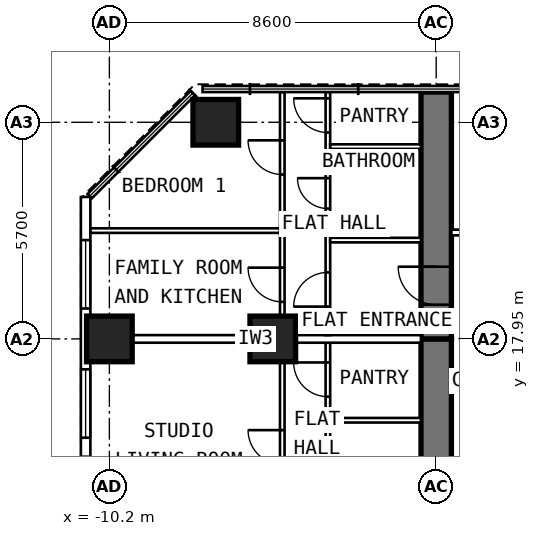
"""IFC4 building model, lengths in metres.
Left out: names, types, materials, properties, quantities, classifications, styles, units other than length and angle.
Written with IfcOpenShell. Run it as: python <this file> out.ifc"""

import sys

from ifc_helpers import new_model, si_unit, direction, frame, frame_2d, origin, origin_2d, place, context, subcontext, project, spatial, rectangle, extrude, element, fill, save


model = new_model("IFC4")
c1 = context("Model", 3, precision=1e-05, world=origin(), true_north=direction((0.0, 1.0)))
c2 = subcontext(c1, "Body", "Model", "MODEL_VIEW")
j1 = project(units=[si_unit("LENGTHUNIT", "METRE"), si_unit("PLANEANGLEUNIT", "RADIAN")], contexts=[c1])
p1 = place(None, origin())
s1 = spatial("IfcSite", under=j1, at=p1, CompositionType="ELEMENT")
p2 = place(p1, origin())
s2 = spatial("IfcBuilding", under=s1, at=p2, CompositionType="ELEMENT")
p3 = place(p2, frame((0.0, 0.0, 123.8)))
s3 = spatial("IfcBuildingStorey", under=s2, at=p3, CompositionType="ELEMENT", Elevation=123.8)
for number, where, z_axis, x_axis in (
    (1, (-10.2, 17.95, 0.0), (0.0, 0.0, 1.0), (0.0, 1.0, 0.0)),
    (2, (-7.4, 23.65, 0.0), (0.0, 0.0, 1.0), (0.0, 1.0, 0.0)),
    (3, (-5.9, 17.95, 0.0), (0.0, 0.0, 1.0), (0.0, 1.0, 0.0)),
):
    element("IfcColumn", number, at=place(p3, frame(where, z_axis=z_axis, x_axis=x_axis)), inside=s3, PredefinedType="COLUMN", context=c2, shape_type="SweptSolid", body=[
        extrude(rectangle(XDim=1.2, YDim=1.2, at=origin_2d()), origin(), (0.0, 0.0, 1.0), 3.6),
    ])
p4 = place(p3, frame((-1.6, 9.6, 0.0), z_axis=(0.0, 0.0, 1.0), x_axis=(0.0, 1.0, 0.0)))
e4 = element("IfcWall", 4, at=p4, inside=s3, PredefinedType="SHEAR", context=c2, shape_type="SweptSolid", body=[
    extrude(rectangle(XDim=8.35, YDim=0.8, at=frame_2d((4.175, 0.0))), origin(), (0.0, 0.0, 1.0), 3.6),
])
p5 = place(p4, frame((1.3, 0.0, 0.0)))
e5 = element("IfcOpeningElement", 5, at=p5, cuts=e4, PredefinedType="OPENING", context=c2, shape_type="SweptSolid", body=[
    extrude(rectangle(XDim=1.0, YDim=2.1, at=frame_2d((0.5, 1.05))), frame((0.0, 0.412, 0.0), z_axis=(0.0, -1.0, 0.0), x_axis=(1.0, 0.0, 0.0)), (0.0, 0.0, 1.0), 0.824),
])
p6 = place(p3, frame((-1.6, 17.95, 0.0), z_axis=(0.0, 0.0, 1.0), x_axis=(0.0, 1.0, 0.0)))
e6 = element("IfcWall", 6, at=p6, inside=s3, PredefinedType="SHEAR", context=c2, shape_type="SweptSolid", body=[
    extrude(rectangle(XDim=6.495, YDim=0.8, at=frame_2d((3.248, 0.0))), origin(), (0.0, 0.0, 1.0), 3.6),
])
p7 = place(p6, frame((0.9, 0.0, 0.0)))
e7 = element("IfcOpeningElement", 7, at=p7, cuts=e6, PredefinedType="OPENING", context=c2, shape_type="SweptSolid", body=[
    extrude(rectangle(XDim=1.0, YDim=2.1, at=frame_2d((0.5, 1.05))), frame((0.0, 0.412, 0.0), z_axis=(0.0, -1.0, 0.0), x_axis=(1.0, 0.0, 0.0)), (0.0, 0.0, 1.0), 0.824),
])
p8 = place(p3, frame((-10.825, 6.409, 0.0), z_axis=(0.0, 0.0, 1.0), x_axis=(0.0, 1.0, 0.0)))
e8 = element("IfcWall", 8, at=p8, inside=s3, PredefinedType="SOLIDWALL", context=c2, shape_type="SweptSolid", body=[
    extrude(rectangle(XDim=15.276, YDim=0.25, at=frame_2d((7.638, 0.0))), origin(), (0.0, 0.0, 1.0), 3.35),
])
p9 = place(p8, frame((0.941, 0.0, 0.8)))
e9 = element("IfcOpeningElement", 9, at=p9, cuts=e8, PredefinedType="OPENING", context=c2, shape_type="SweptSolid", body=[
    extrude(rectangle(XDim=1.8, YDim=1.8, at=frame_2d((0.9, 0.9))), frame((0.0, 0.137, 0.0), z_axis=(0.0, -1.0, 0.0), x_axis=(1.0, 0.0, 0.0)), (0.0, 0.0, 1.0), 0.274),
])
p10 = place(p8, frame((3.241, 0.0, 0.8)))
e10 = element("IfcOpeningElement", 10, at=p10, cuts=e8, PredefinedType="OPENING", context=c2, shape_type="SweptSolid", body=[
    extrude(rectangle(XDim=1.8, YDim=1.8, at=frame_2d((0.9, 0.9))), frame((0.0, 0.137, 0.0), z_axis=(0.0, -1.0, 0.0), x_axis=(1.0, 0.0, 0.0)), (0.0, 0.0, 1.0), 0.274),
])
p11 = place(p8, frame((6.641, 0.0, 0.8)))
e11 = element("IfcOpeningElement", 11, at=p11, cuts=e8, PredefinedType="OPENING", context=c2, shape_type="SweptSolid", body=[
    extrude(rectangle(XDim=1.8, YDim=1.8, at=frame_2d((0.9, 0.9))), frame((0.0, 0.137, 0.0), z_axis=(0.0, -1.0, 0.0), x_axis=(1.0, 0.0, 0.0)), (0.0, 0.0, 1.0), 0.274),
])
p12 = place(p8, frame((8.941, 0.0, 0.8)))
e12 = element("IfcOpeningElement", 12, at=p12, cuts=e8, PredefinedType="OPENING", context=c2, shape_type="SweptSolid", body=[
    extrude(rectangle(XDim=1.8, YDim=1.8, at=frame_2d((0.9, 0.9))), frame((0.0, 0.137, 0.0), z_axis=(0.0, -1.0, 0.0), x_axis=(1.0, 0.0, 0.0)), (0.0, 0.0, 1.0), 0.274),
])
p13 = place(p8, frame((12.341, 0.0, 0.8)))
e13 = element("IfcOpeningElement", 13, at=p13, cuts=e8, PredefinedType="OPENING", context=c2, shape_type="SweptSolid", body=[
    extrude(rectangle(XDim=1.8, YDim=1.8, at=frame_2d((0.9, 0.9))), frame((0.0, 0.137, 0.0), z_axis=(0.0, -1.0, 0.0), x_axis=(1.0, 0.0, 0.0)), (0.0, 0.0, 1.0), 0.274),
])
p14 = place(p3, frame((-4.45, 10.05, 0.0), z_axis=(0.0, 0.0, 1.0), x_axis=(0.0, 1.0, 0.0)))
e14 = element("IfcWall", 14, at=p14, inside=s3, PredefinedType="PARTITIONING", context=c2, shape_type="SweptSolid", body=[
    extrude(rectangle(XDim=7.8, YDim=0.12, at=frame_2d((3.9, 0.0))), origin(), (0.0, 0.0, 1.0), 3.35),
])
p15 = place(p14, frame((0.8, 0.0, 0.0)))
e15 = element("IfcOpeningElement", 15, at=p15, cuts=e14, PredefinedType="OPENING", context=c2, shape_type="SweptSolid", body=[
    extrude(rectangle(XDim=0.9, YDim=2.1, at=frame_2d((0.45, 1.05))), frame((0.0, 0.072, 0.0), z_axis=(0.0, -1.0, 0.0), x_axis=(1.0, 0.0, 0.0)), (0.0, 0.0, 1.0), 0.144),
])
p16 = place(p14, frame((3.755, 0.0, 0.0)))
e16 = element("IfcOpeningElement", 16, at=p16, cuts=e14, PredefinedType="OPENING", context=c2, shape_type="SweptSolid", body=[
    extrude(rectangle(XDim=0.8, YDim=2.1, at=frame_2d((0.4, 1.05))), frame((0.0, 0.072, 0.0), z_axis=(0.0, -1.0, 0.0), x_axis=(1.0, 0.0, 0.0)), (0.0, 0.0, 1.0), 0.144),
])
p17 = place(p14, frame((6.38, 0.0, 0.0)))
e17 = element("IfcOpeningElement", 17, at=p17, cuts=e14, PredefinedType="OPENING", context=c2, shape_type="SweptSolid", body=[
    extrude(rectangle(XDim=0.9, YDim=2.1, at=frame_2d((0.45, 1.05))), frame((0.0, 0.072, 0.0), z_axis=(0.0, -1.0, 0.0), x_axis=(1.0, 0.0, 0.0)), (0.0, 0.0, 1.0), 0.144),
])
p18 = place(p3, frame((-5.65, 9.6, 0.0), z_axis=(0.0, 0.0, 1.0), x_axis=(0.0, 1.0, 0.0)))
e18 = element("IfcWall", 18, at=p18, inside=s3, PredefinedType="PARTITIONING", context=c2, shape_type="SweptSolid", body=[
    extrude(rectangle(XDim=8.1, YDim=0.12, at=frame_2d((4.05, 0.0))), origin(), (0.0, 0.0, 1.0), 3.35),
])
p19 = place(p18, frame((5.05, 0.0, 0.0)))
e19 = element("IfcOpeningElement", 19, at=p19, cuts=e18, PredefinedType="OPENING", context=c2, shape_type="SweptSolid", body=[
    extrude(rectangle(XDim=0.9, YDim=2.1, at=frame_2d((0.45, 1.05))), frame((0.0, 0.072, 0.0), z_axis=(0.0, -1.0, 0.0), x_axis=(1.0, 0.0, 0.0)), (0.0, 0.0, 1.0), 0.144),
])
p20 = place(p3, frame((-2.0, 15.81, 0.0), z_axis=(0.0, 0.0, 1.0), x_axis=(-1.0, 0.0, 0.0)))
e20 = element("IfcWall", 20, at=p20, inside=s3, PredefinedType="PARTITIONING", context=c2, shape_type="SweptSolid", body=[
    extrude(rectangle(XDim=2.39, YDim=0.12, at=frame_2d((1.195, 0.0))), origin(), (0.0, 0.0, 1.0), 3.35),
])
p21 = place(p3, frame((-4.45, 18.05, 0.0), z_axis=(0.0, 0.0, 1.0), x_axis=(0.0, 1.0, 0.0)))
e21 = element("IfcWall", 21, at=p21, inside=s3, PredefinedType="PARTITIONING", context=c2, shape_type="SweptSolid", body=[
    extrude(rectangle(XDim=6.395, YDim=0.12, at=frame_2d((3.198, 0.0))), origin(), (0.0, 0.0, 1.0), 3.35),
])
p22 = place(p21, frame((0.75, 0.0, 0.0)))
e22 = element("IfcOpeningElement", 22, at=p22, cuts=e21, PredefinedType="OPENING", context=c2, shape_type="SweptSolid", body=[
    extrude(rectangle(XDim=0.9, YDim=2.1, at=frame_2d((0.45, 1.05))), frame((0.0, 0.072, 0.0), z_axis=(0.0, -1.0, 0.0), x_axis=(1.0, 0.0, 0.0)), (0.0, 0.0, 1.0), 0.144),
])
p23 = place(p21, frame((3.33, 0.0, 0.0)))
e23 = element("IfcOpeningElement", 23, at=p23, cuts=e21, PredefinedType="OPENING", context=c2, shape_type="SweptSolid", body=[
    extrude(rectangle(XDim=0.8, YDim=2.1, at=frame_2d((0.4, 1.05))), frame((0.0, 0.072, 0.0), z_axis=(0.0, -1.0, 0.0), x_axis=(1.0, 0.0, 0.0)), (0.0, 0.0, 1.0), 0.144),
])
p24 = place(p21, frame((5.33, 0.0, 0.0)))
e24 = element("IfcOpeningElement", 24, at=p24, cuts=e21, PredefinedType="OPENING", context=c2, shape_type="SweptSolid", body=[
    extrude(rectangle(XDim=0.9, YDim=2.1, at=frame_2d((0.45, 1.05))), frame((0.0, 0.072, 0.0), z_axis=(0.0, -1.0, 0.0), x_axis=(1.0, 0.0, 0.0)), (0.0, 0.0, 1.0), 0.144),
])
p25 = place(p3, frame((-5.65, 18.05, 0.0), z_axis=(0.0, 0.0, 1.0), x_axis=(0.0, 1.0, 0.0)))
e25 = element("IfcWall", 25, at=p25, inside=s3, PredefinedType="PARTITIONING", context=c2, shape_type="SweptSolid", body=[
    extrude(rectangle(XDim=6.395, YDim=0.12, at=frame_2d((3.198, 0.0))), origin(), (0.0, 0.0, 1.0), 3.35),
])
p26 = place(p25, frame((0.875, 0.0, 0.0)))
e26 = element("IfcOpeningElement", 26, at=p26, cuts=e25, PredefinedType="OPENING", context=c2, shape_type="SweptSolid", body=[
    extrude(rectangle(XDim=0.9, YDim=2.1, at=frame_2d((0.45, 1.05))), frame((0.0, 0.072, 0.0), z_axis=(0.0, -1.0, 0.0), x_axis=(1.0, 0.0, 0.0)), (0.0, 0.0, 1.0), 0.144),
])
p27 = place(p25, frame((4.225, 0.0, 0.0)))
e27 = element("IfcOpeningElement", 27, at=p27, cuts=e25, PredefinedType="OPENING", context=c2, shape_type="SweptSolid", body=[
    extrude(rectangle(XDim=0.9, YDim=2.1, at=frame_2d((0.45, 1.05))), frame((0.0, 0.072, 0.0), z_axis=(0.0, -1.0, 0.0), x_axis=(1.0, 0.0, 0.0)), (0.0, 0.0, 1.0), 0.144),
])
p28 = place(p3, frame((-5.71, 20.8, 0.0), z_axis=(0.0, 0.0, 1.0), x_axis=(-1.0, 0.0, 0.0)))
e28 = element("IfcWall", 28, at=p28, inside=s3, PredefinedType="PARTITIONING", context=c2, shape_type="SweptSolid", body=[
    extrude(rectangle(XDim=4.99, YDim=0.12, at=frame_2d((2.495, 0.0))), origin(), (0.0, 0.0, 1.0), 3.35),
])
for number, where, z_axis, x_axis in (
    (29, (-2.0, 20.55, 0.0), (0.0, 0.0, 1.0), (-1.0, 0.0, 0.0)),
    (30, (-2.0, 23.01, 0.0), (0.0, 0.0, 1.0), (-1.0, 0.0, 0.0)),
):
    element("IfcWall", number, at=place(p3, frame(where, z_axis=z_axis, x_axis=x_axis)), inside=s3, PredefinedType="PARTITIONING", context=c2, shape_type="SweptSolid", body=[
        extrude(rectangle(XDim=2.39, YDim=0.12, at=frame_2d((1.195, 0.0))), origin(), (0.0, 0.0, 1.0), 3.35),
    ])
p29 = place(p3, frame((-2.0, 17.95, 0.0), z_axis=(0.0, 0.0, 1.0), x_axis=(-1.0, 0.0, 0.0)))
e31 = element("IfcWall", 31, at=p29, inside=s3, PredefinedType="PARTITIONING", context=c2, shape_type="SweptSolid", body=[
    extrude(rectangle(XDim=8.7, YDim=0.2, at=frame_2d((4.35, 0.0))), origin(), (0.0, 0.0, 1.0), 2.45),
])
p30 = place(p3, frame((1.2, 20.75, 0.0), z_axis=(0.0, 0.0, 1.0), x_axis=(-1.0, 0.0, 0.0)))
e32 = element("IfcWall", 32, at=p30, inside=s3, PredefinedType="PARTITIONING", context=c2, shape_type="SweptSolid", body=[
    extrude(rectangle(XDim=2.4, YDim=0.15, at=frame_2d((1.2, 0.0))), origin(), (0.0, 0.0, 1.0), 3.35),
])
p31 = place(p30, frame((0.7, 0.0, 0.0)))
e33 = element("IfcOpeningElement", 33, at=p31, cuts=e32, PredefinedType="OPENING", context=c2, shape_type="SweptSolid", body=[
    extrude(rectangle(XDim=1.0, YDim=2.1, at=frame_2d((0.5, 1.05))), frame((0.0, 0.087, 0.0), z_axis=(0.0, -1.0, 0.0), x_axis=(1.0, 0.0, 0.0)), (0.0, 0.0, 1.0), 0.174),
])
p32 = place(p12, origin())
e34 = element("IfcWindow", 34, at=p32, inside=s3, PartitioningType="SINGLE_PANEL", PredefinedType="WINDOW", context=c2, shape_type="SweptSolid", body=[
    extrude(rectangle(XDim=1.8, YDim=1.8, at=frame_2d((0.9, 0.9))), frame((0.0, 0.03, 0.0), z_axis=(0.0, -1.0, 0.0), x_axis=(1.0, 0.0, 0.0)), (0.0, 0.0, 1.0), 0.06),
])
fill(e12, e34)
p33 = place(p13, origin())
e35 = element("IfcWindow", 35, at=p33, inside=s3, PartitioningType="SINGLE_PANEL", PredefinedType="WINDOW", context=c2, shape_type="SweptSolid", body=[
    extrude(rectangle(XDim=1.8, YDim=1.8, at=frame_2d((0.9, 0.9))), frame((0.0, 0.03, 0.0), z_axis=(0.0, -1.0, 0.0), x_axis=(1.0, 0.0, 0.0)), (0.0, 0.0, 1.0), 0.06),
])
fill(e13, e35)
p34 = place(p19, origin())
e36 = element("IfcDoor", 36, at=p34, inside=s3, OperationType="SINGLE_SWING_RIGHT", PredefinedType="DOOR", context=c2, shape_type="SweptSolid", body=[
    extrude(rectangle(XDim=0.9, YDim=2.1, at=frame_2d((0.45, 1.05))), frame((0.0, 0.025, 0.0), z_axis=(0.0, -1.0, 0.0), x_axis=(1.0, 0.0, 0.0)), (0.0, 0.0, 1.0), 0.05),
])
fill(e19, e36)
p35 = place(p17, origin())
e37 = element("IfcDoor", 37, at=p35, inside=s3, OperationType="SINGLE_SWING_RIGHT", PredefinedType="DOOR", context=c2, shape_type="SweptSolid", body=[
    extrude(rectangle(XDim=0.9, YDim=2.1, at=frame_2d((0.45, 1.05))), frame((0.0, 0.025, 0.0), z_axis=(0.0, -1.0, 0.0), x_axis=(1.0, 0.0, 0.0)), (0.0, 0.0, 1.0), 0.05),
])
fill(e17, e37)
p36 = place(p7, origin())
e38 = element("IfcDoor", 38, at=p36, inside=s3, OperationType="SINGLE_SWING_RIGHT", PredefinedType="DOOR", context=c2, shape_type="SweptSolid", body=[
    extrude(rectangle(XDim=1.0, YDim=2.1, at=frame_2d((0.5, 1.05))), frame((0.0, 0.15, 0.0), z_axis=(0.0, -1.0, 0.0), x_axis=(1.0, 0.0, 0.0)), (0.0, 0.0, 1.0), 0.3),
])
fill(e7, e38)
p37 = place(p26, origin())
e39 = element("IfcDoor", 39, at=p37, inside=s3, OperationType="SINGLE_SWING_RIGHT", PredefinedType="DOOR", context=c2, shape_type="SweptSolid", body=[
    extrude(rectangle(XDim=0.9, YDim=2.1, at=frame_2d((0.45, 1.05))), frame((0.0, 0.025, 0.0), z_axis=(0.0, -1.0, 0.0), x_axis=(1.0, 0.0, 0.0)), (0.0, 0.0, 1.0), 0.05),
])
fill(e26, e39)
p38 = place(p27, origin())
e40 = element("IfcDoor", 40, at=p38, inside=s3, OperationType="SINGLE_SWING_RIGHT", PredefinedType="DOOR", context=c2, shape_type="SweptSolid", body=[
    extrude(rectangle(XDim=0.9, YDim=2.1, at=frame_2d((0.45, 1.05))), frame((0.0, 0.025, 0.0), z_axis=(0.0, -1.0, 0.0), x_axis=(1.0, 0.0, 0.0)), (0.0, 0.0, 1.0), 0.05),
])
fill(e27, e40)
p39 = place(p22, origin())
e41 = element("IfcDoor", 41, at=p39, inside=s3, OperationType="SINGLE_SWING_LEFT", PredefinedType="DOOR", context=c2, shape_type="SweptSolid", body=[
    extrude(rectangle(XDim=0.9, YDim=2.1, at=frame_2d((0.45, 1.05))), frame((0.0, 0.025, 0.0), z_axis=(0.0, -1.0, 0.0), x_axis=(1.0, 0.0, 0.0)), (0.0, 0.0, 1.0), 0.05),
])
fill(e22, e41)
p40 = place(p23, origin())
e42 = element("IfcDoor", 42, at=p40, inside=s3, OperationType="SINGLE_SWING_RIGHT", PredefinedType="DOOR", context=c2, shape_type="SweptSolid", body=[
    extrude(rectangle(XDim=0.8, YDim=2.1, at=frame_2d((0.4, 1.05))), frame((0.0, 0.025, 0.0), z_axis=(0.0, -1.0, 0.0), x_axis=(1.0, 0.0, 0.0)), (0.0, 0.0, 1.0), 0.05),
])
fill(e23, e42)
p41 = place(p24, origin())
e43 = element("IfcDoor", 43, at=p41, inside=s3, OperationType="SINGLE_SWING_RIGHT", PredefinedType="DOOR", context=c2, shape_type="SweptSolid", body=[
    extrude(rectangle(XDim=0.9, YDim=2.1, at=frame_2d((0.45, 1.05))), frame((0.0, 0.025, 0.0), z_axis=(0.0, -1.0, 0.0), x_axis=(1.0, 0.0, 0.0)), (0.0, 0.0, 1.0), 0.05),
])
fill(e24, e43)
save(model, sys.argv[1])
